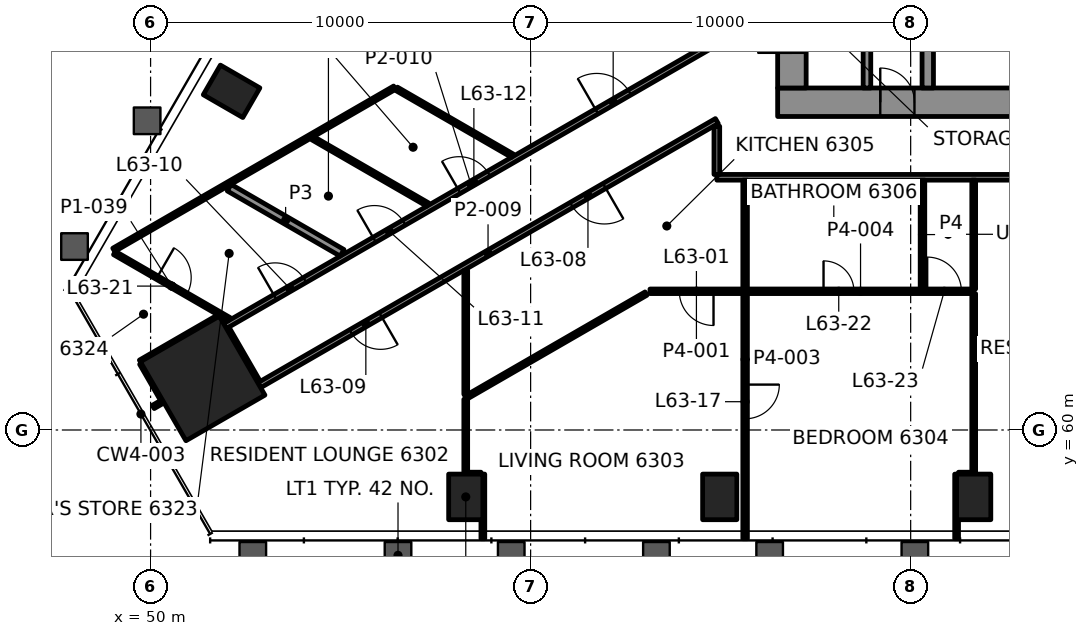
"""IFC4 building model, lengths in metres.
Left out: names, types, materials, properties, quantities, classifications, styles, units other than length and angle.
Written with IfcOpenShell. Run it as: python <this file> out.ifc"""

import sys

from ifc_helpers import new_model, si_unit, direction, frame, frame_2d, origin, origin_2d, place, context, subcontext, project, spatial, rectangle, hollow_rectangle, extrude, element, fill, save


model = new_model("IFC4")
c1 = context("Model", 3, precision=1e-05, world=origin(), true_north=direction((0.0, 1.0)))
c2 = subcontext(c1, "Body", "Model", "MODEL_VIEW")
j1 = project(units=[si_unit("LENGTHUNIT", "METRE"), si_unit("PLANEANGLEUNIT", "RADIAN")], contexts=[c1])
p1 = place(None, origin())
s1 = spatial("IfcSite", under=j1, at=p1, CompositionType="ELEMENT")
p2 = place(p1, origin())
s2 = spatial("IfcBuilding", under=s1, at=p2, CompositionType="ELEMENT")
p3 = place(p2, frame((0.0, 0.0, 267.1)))
s3 = spatial("IfcBuildingStorey", under=s2, at=p3, CompositionType="ELEMENT", Elevation=267.1)
p4 = place(p3, frame((51.37, 61.357, 0.0), z_axis=(0.0, 0.0, 1.0), x_axis=(0.5, -0.866025403784, 0.0)))
e1 = element("IfcColumn", 1, at=p4, inside=s3, PredefinedType="COLUMN", context=c2, shape_type="SweptSolid", body=[
    extrude(rectangle(XDim=2.4, YDim=2.4, at=origin_2d()), origin(), (0.0, 0.0, 1.0), 3.5),
])
for number, where, z_axis, x_axis in (
    (2, (58.293, 58.239, -0.0), (0.0, 0.0, 1.0), (1.0, 0.0, 0.0)),
    (3, (64.976, 58.239, -0.0), (0.0, 0.0, 1.0), (1.0, 0.0, 0.0)),
    (4, (71.659, 58.239, -0.0), (0.0, 0.0, 1.0), (1.0, 0.0, 0.0)),
    (5, (52.131, 68.912, -0.0), (0.0, 0.0, 1.0), (-0.5, -0.866, 0.0)),
):
    element("IfcColumn", number, at=place(p3, frame(where, z_axis=z_axis, x_axis=x_axis)), inside=s3, PredefinedType="COLUMN", context=c2, shape_type="SweptSolid", body=[
        extrude(hollow_rectangle(XDim=0.9, YDim=1.2, WallThickness=0.06, at=origin_2d()), origin(), (0.0, 0.0, 1.0), 3.5),
    ])
p5 = place(p3, frame((66.5, 68.625, 0.0), z_axis=(0.0, 0.0, 1.0), x_axis=(1.0, 0.0, 0.0)))
e6 = element("IfcWall", 6, at=p5, inside=s3, PredefinedType="SHEAR", context=c2, shape_type="SweptSolid", body=[
    extrude(rectangle(XDim=17.0, YDim=0.75, at=frame_2d((8.5, 0.0))), origin(), (0.0, 0.0, 1.0), 3.3),
])
p6 = place(p5, frame((2.7, 0.0, 0.0)))
e7 = element("IfcOpeningElement", 7, at=p6, cuts=e6, PredefinedType="OPENING", context=c2, shape_type="SweptSolid", body=[
    extrude(rectangle(XDim=0.9, YDim=2.1, at=frame_2d((0.45, 1.05))), frame((0.0, 0.385, 0.0), z_axis=(0.0, -1.0, 0.0), x_axis=(1.0, 0.0, 0.0)), (0.0, 0.0, 1.0), 0.77),
])
p7 = place(p3, frame((66.875, 69.0, 0.0), z_axis=(0.0, 0.0, 1.0), x_axis=(0.0, 1.0, 0.0)))
e8 = element("IfcWall", 8, at=p7, inside=s3, PredefinedType="SHEAR", context=c2, shape_type="SweptSolid", body=[
    extrude(rectangle(XDim=12.0, YDim=0.75, at=frame_2d((6.0, 0.0))), origin(), (0.0, 0.0, 1.0), 3.3),
])
p8 = place(p7, frame((3.7, 0.0, 0.0)))
e9 = element("IfcOpeningElement", 9, at=p8, cuts=e8, PredefinedType="OPENING", context=c2, shape_type="SweptSolid", body=[
    extrude(rectangle(XDim=1.2, YDim=2.1, at=frame_2d((0.6, 1.05))), frame((0.0, 0.385, 0.0), z_axis=(0.0, -1.0, 0.0), x_axis=(1.0, 0.0, 0.0)), (0.0, 0.0, 1.0), 0.77),
])
p9 = place(p7, frame((0.925, 0.0, 0.0)))
e10 = element("IfcOpeningElement", 10, at=p9, cuts=e8, PredefinedType="OPENING", context=c2, shape_type="SweptSolid", body=[
    extrude(rectangle(XDim=0.9, YDim=2.1, at=frame_2d((0.45, 1.05))), frame((0.0, 0.385, 0.0), z_axis=(0.0, -1.0, 0.0), x_axis=(1.0, 0.0, 0.0)), (0.0, 0.0, 1.0), 0.77),
])
p10 = place(p3, frame((70.45, 69.0, 0.0), z_axis=(0.0, 0.0, 1.0), x_axis=(0.0, 1.0, 0.0)))
e11 = element("IfcWall", 11, at=p10, inside=s3, PredefinedType="SHEAR", context=c2, shape_type="SweptSolid", body=[
    extrude(rectangle(XDim=2.6, YDim=0.3, at=frame_2d((1.3, 0.0))), origin(), (0.0, 0.0, 1.0), 3.3),
])
p11 = place(p3, frame((58.343, 58.839, 0.0), z_axis=(0.0, 0.0, 1.0), x_axis=(1.0, 0.0, 0.0)))
e12 = element("IfcWall", 12, at=p11, inside=s3, PredefinedType="PARTITIONING", context=c2, shape_type="SweptSolid", body=[
    extrude(rectangle(XDim=0.35, YDim=0.1, at=frame_2d((0.175, 0.0))), origin(), (0.0, 0.0, 1.0), 2.7),
])
p12 = place(p3, frame((71.259, 58.839, 0.0), z_axis=(0.0, 0.0, 1.0), x_axis=(1.0, 0.0, 0.0)))
e13 = element("IfcWall", 13, at=p12, inside=s3, PredefinedType="PARTITIONING", context=c2, shape_type="SweptSolid", body=[
    extrude(rectangle(XDim=0.349, YDim=0.1, at=frame_2d((0.174, 0.0))), origin(), (0.0, 0.0, 1.0), 2.7),
])
p13 = place(p3, frame((65.584, 63.65, 0.0), z_axis=(0.0, 0.0, 1.0), x_axis=(-1.0, 0.0, 0.0)))
e14 = element("IfcWall", 14, at=p13, inside=s3, PredefinedType="PARTITIONING", context=c2, shape_type="SweptSolid", body=[
    extrude(rectangle(XDim=2.443, YDim=0.12, at=frame_2d((1.221, 0.0))), origin(), (0.0, 0.0, 1.0), 2.7),
])
p14 = place(p13, frame((0.771, 0.0, 0.0)))
e15 = element("IfcOpeningElement", 15, at=p14, cuts=e14, PredefinedType="OPENING", context=c2, shape_type="SweptSolid", body=[
    extrude(rectangle(XDim=0.9, YDim=2.1, at=frame_2d((0.45, 1.05))), frame((0.0, 0.07, 0.0), z_axis=(0.0, -1.0, 0.0), x_axis=(1.0, 0.0, 0.0)), (0.0, 0.0, 1.0), 0.14),
])
p15 = place(p3, frame((85.1, 66.65, 0.0), z_axis=(0.0, 0.0, 1.0), x_axis=(-1.0, 0.0, 0.0)))
e16 = element("IfcWall", 16, at=p15, inside=s3, PredefinedType="PARTITIONING", context=c2, shape_type="SweptSolid", body=[
    extrude(rectangle(XDim=20.2, YDim=0.15, at=frame_2d((10.1, 0.0))), origin(), (0.0, 0.0, 1.0), 2.7),
])
p16 = place(p15, frame((1.61, 0.0, 0.0)))
e17 = element("IfcOpeningElement", 17, at=p16, cuts=e16, PredefinedType="OPENING", context=c2, shape_type="SweptSolid", body=[
    extrude(rectangle(XDim=1.0, YDim=2.1, at=frame_2d((0.5, 1.05))), frame((0.0, 0.085, 0.0), z_axis=(0.0, -1.0, 0.0), x_axis=(1.0, 0.0, 0.0)), (0.0, 0.0, 1.0), 0.17),
])
p17 = place(p15, frame((8.229, 0.0, 0.0)))
e18 = element("IfcOpeningElement", 18, at=p17, cuts=e16, PredefinedType="OPENING", context=c2, shape_type="SweptSolid", body=[
    extrude(rectangle(XDim=1.0, YDim=2.1, at=frame_2d((0.5, 1.05))), frame((0.0, 0.085, 0.0), z_axis=(0.0, -1.0, 0.0), x_axis=(1.0, 0.0, 0.0)), (0.0, 0.0, 1.0), 0.17),
])
p18 = place(p3, frame((58.293, 60.851, 0.0), z_axis=(0.0, 0.0, 1.0), x_axis=(0.866026762963, 0.499997645826, 0.0)))
e19 = element("IfcWall", 19, at=p18, inside=s3, PredefinedType="PARTITIONING", context=c2, shape_type="SweptSolid", body=[
    extrude(rectangle(XDim=5.478, YDim=0.1, at=frame_2d((2.739, 0.0))), origin(), (0.0, 0.0, 1.0), 2.7),
])
p19 = place(p3, frame((64.9, 68.13, 0.0), z_axis=(0.0, 0.0, 1.0), x_axis=(-0.866020369651, -0.500008719273, 0.0)))
e20 = element("IfcWall", 20, at=p19, inside=s3, PredefinedType="PARTITIONING", context=c2, shape_type="SweptSolid", body=[
    extrude(rectangle(XDim=13.904, YDim=0.15, at=frame_2d((6.952, 0.0))), origin(), (0.0, 0.0, 1.0), 2.547),
])
p20 = place(p19, frame((3.416, 0.0, 0.0)))
e21 = element("IfcOpeningElement", 21, at=p20, cuts=e20, PredefinedType="OPENING", context=c2, shape_type="SweptSolid", body=[
    extrude(rectangle(XDim=1.0, YDim=2.1, at=frame_2d((0.5, 1.05))), frame((0.0, 0.085, 0.0), z_axis=(0.0, -1.0, 0.0), x_axis=(1.0, 0.0, 0.0)), (0.0, 0.0, 1.0), 0.17),
])
p21 = place(p19, frame((10.215, 0.0, 0.0)))
e22 = element("IfcOpeningElement", 22, at=p21, cuts=e20, PredefinedType="OPENING", context=c2, shape_type="SweptSolid", body=[
    extrude(rectangle(XDim=0.9, YDim=2.1, at=frame_2d((0.45, 1.05))), frame((0.0, 0.085, 0.0), z_axis=(0.0, -1.0, 0.0), x_axis=(1.0, 0.0, 0.0)), (0.0, 0.0, 1.0), 0.17),
])
p22 = place(p3, frame((50.07, 60.607, 0.0), z_axis=(0.0, 0.0, 1.0), x_axis=(0.866071776036, 0.499919672301, 0.0)))
e23 = element("IfcWall", 23, at=p22, inside=s3, PredefinedType="PARTITIONING", context=c2, shape_type="SweptSolid", body=[
    extrude(rectangle(XDim=0.25, YDim=0.1, at=frame_2d((0.125, 0.0))), origin(), (0.0, 0.0, 1.0), 2.7),
])
p23 = place(p3, frame((51.959, 62.736, 0.0), z_axis=(0.0, 0.0, 1.0), x_axis=(0.866022614424, 0.500004831283, 0.0)))
e24 = element("IfcWall", 24, at=p23, inside=s3, PredefinedType="PARTITIONING", context=c2, shape_type="SweptSolid", body=[
    extrude(rectangle(XDim=14.943, YDim=0.15, at=frame_2d((7.472, 0.0))), origin(), (0.0, 0.0, 1.0), 2.7),
])
p24 = place(p23, frame((1.522, 0.0, 0.0)))
e25 = element("IfcOpeningElement", 25, at=p24, cuts=e24, PredefinedType="OPENING", context=c2, shape_type="SweptSolid", body=[
    extrude(rectangle(XDim=0.9, YDim=2.1, at=frame_2d((0.45, 1.05))), frame((0.0, 0.085, 0.0), z_axis=(0.0, -1.0, 0.0), x_axis=(1.0, 0.0, 0.0)), (0.0, 0.0, 1.0), 0.17),
])
p25 = place(p23, frame((4.539, 0.0, 0.0)))
e26 = element("IfcOpeningElement", 26, at=p25, cuts=e24, PredefinedType="OPENING", context=c2, shape_type="SweptSolid", body=[
    extrude(rectangle(XDim=0.9, YDim=2.1, at=frame_2d((0.45, 1.05))), frame((0.0, 0.085, 0.0), z_axis=(0.0, -1.0, 0.0), x_axis=(1.0, 0.0, 0.0)), (0.0, 0.0, 1.0), 0.17),
])
p26 = place(p23, frame((7.111, 0.0, 0.0)))
e27 = element("IfcOpeningElement", 27, at=p26, cuts=e24, PredefinedType="OPENING", context=c2, shape_type="SweptSolid", body=[
    extrude(rectangle(XDim=0.9, YDim=2.1, at=frame_2d((0.45, 1.05))), frame((0.0, 0.085, 0.0), z_axis=(0.0, -1.0, 0.0), x_axis=(1.0, 0.0, 0.0)), (0.0, 0.0, 1.0), 0.17),
])
p27 = place(p23, frame((11.294, 0.0, 0.0)))
e28 = element("IfcOpeningElement", 28, at=p27, cuts=e24, PredefinedType="OPENING", context=c2, shape_type="SweptSolid", body=[
    extrude(rectangle(XDim=1.0, YDim=2.1, at=frame_2d((0.5, 1.05))), frame((0.0, 0.085, 0.0), z_axis=(0.0, -1.0, 0.0), x_axis=(1.0, 0.0, 0.0)), (0.0, 0.0, 1.0), 0.17),
])
p28 = place(p3, frame((49.73, 61.796, 0.0), z_axis=(0.0, 0.0, 1.0), x_axis=(0.86603458294, 0.499984100898, 0.0)))
e29 = element("IfcWall", 29, at=p28, inside=s3, PredefinedType="PARTITIONING", context=c2, shape_type="SweptSolid", body=[
    extrude(rectangle(XDim=2.342, YDim=0.1, at=frame_2d((1.171, 0.0))), origin(), (0.0, 0.0, 1.0), 2.7),
])
p29 = place(p3, frame((49.03, 64.741, 0.0), z_axis=(0.0, 0.0, 1.0), x_axis=(0.866019796467, 0.500009712033, 0.0)))
e30 = element("IfcWall", 30, at=p29, inside=s3, PredefinedType="PARTITIONING", context=c2, shape_type="SweptSolid", body=[
    extrude(rectangle(XDim=8.534, YDim=0.1, at=frame_2d((4.267, 0.0))), origin(), (0.0, 0.0, 1.0), 2.7),
])
p30 = place(p3, frame((71.659, 58.84, 0.0), z_axis=(0.0, 0.0, 1.0), x_axis=(0.0, 1.0, 0.0)))
e31 = element("IfcWall", 31, at=p30, inside=s3, PredefinedType="PARTITIONING", context=c2, shape_type="SweptSolid", body=[
    extrude(rectangle(XDim=4.75, YDim=0.1, at=frame_2d((2.375, 0.0))), origin(), (0.0, 0.0, 1.0), 2.7),
])
p31 = place(p3, frame((71.209, 57.139, 0.0), z_axis=(0.0, 0.0, 1.0), x_axis=(0.0, 1.0, 0.0)))
e32 = element("IfcWall", 32, at=p31, inside=s3, PredefinedType="PARTITIONING", context=c2, shape_type="SweptSolid", body=[
    extrude(rectangle(XDim=1.699, YDim=0.1, at=frame_2d((0.85, 0.0))), origin(), (0.0, 0.0, 1.0), 2.688),
])
p32 = place(p3, frame((70.311, 63.71, 0.0), z_axis=(0.0, 0.0, 1.0), x_axis=(0.0, 1.0, 0.0)))
e33 = element("IfcWall", 33, at=p32, inside=s3, PredefinedType="PARTITIONING", context=c2, shape_type="SweptSolid", body=[
    extrude(rectangle(XDim=2.865, YDim=0.12, at=frame_2d((1.433, 0.0))), origin(), (0.0, 0.0, 1.0), 2.7),
])
p33 = place(p3, frame((65.644, 66.575, 0.0), z_axis=(0.0, 0.0, 1.0), x_axis=(0.0, -1.0, 0.0)))
e34 = element("IfcWall", 34, at=p33, inside=s3, PredefinedType="PARTITIONING", context=c2, shape_type="SweptSolid", body=[
    extrude(rectangle(XDim=9.436, YDim=0.12, at=frame_2d((4.718, 0.0))), origin(), (0.0, 0.0, 1.0), 2.688),
])
p34 = place(p33, frame((5.38, 0.0, 0.0)))
e35 = element("IfcOpeningElement", 35, at=p34, cuts=e34, PredefinedType="OPENING", context=c2, shape_type="SweptSolid", body=[
    extrude(rectangle(XDim=0.9, YDim=2.1, at=frame_2d((0.45, 1.05))), frame((0.0, 0.07, 0.0), z_axis=(0.0, -1.0, 0.0), x_axis=(1.0, 0.0, 0.0)), (0.0, 0.0, 1.0), 0.14),
])
p35 = place(p3, frame((64.9, 66.725, 0.0), z_axis=(0.0, 0.0, 1.0), x_axis=(0.0, 1.0, 0.0)))
e36 = element("IfcWall", 36, at=p35, inside=s3, PredefinedType="PARTITIONING", context=c2, shape_type="SweptSolid", body=[
    extrude(rectangle(XDim=1.268, YDim=0.15, at=frame_2d((0.634, 0.0))), origin(), (0.0, 0.0, 1.0), 2.547),
])
p36 = place(p3, frame((58.743, 57.139, 0.0), z_axis=(0.0, 0.0, 1.0), x_axis=(0.0, 1.0, 0.0)))
e37 = element("IfcWall", 37, at=p36, inside=s3, PredefinedType="PARTITIONING", context=c2, shape_type="SweptSolid", body=[
    extrude(rectangle(XDim=1.699, YDim=0.1, at=frame_2d((0.85, 0.0))), origin(), (0.0, 0.0, 1.0), 2.688),
])
p37 = place(p3, frame((58.293, 58.839, 0.0), z_axis=(0.0, 0.0, 1.0), x_axis=(0.0, 1.0, 0.0)))
e38 = element("IfcWall", 38, at=p37, inside=s3, PredefinedType="PARTITIONING", context=c2, shape_type="SweptSolid", body=[
    extrude(rectangle(XDim=1.969, YDim=0.1, at=frame_2d((0.984, 0.0))), origin(), (0.0, 0.0, 1.0), 2.7),
])
p38 = place(p3, frame((52.821, 61.243, 0.0), z_axis=(0.0, 0.0, 1.0), x_axis=(-0.499970888758, 0.866042210515, 0.0)))
e39 = element("IfcWall", 39, at=p38, inside=s3, PredefinedType="PARTITIONING", context=c2, shape_type="SweptSolid", body=[
    extrude(rectangle(XDim=1.645, YDim=0.15, at=frame_2d((0.822, 0.0))), origin(), (0.0, 0.0, 1.0), 2.547),
])
p39 = place(p3, frame((50.331, 60.757, 0.0), z_axis=(0.0, 0.0, 1.0), x_axis=(-0.500157339417, 0.865934544771, 0.0)))
e40 = element("IfcWall", 40, at=p39, inside=s3, PredefinedType="PARTITIONING", context=c2, shape_type="SweptSolid", body=[
    extrude(rectangle(XDim=1.15, YDim=0.1, at=frame_2d((0.575, 0.0))), origin(), (0.0, 0.0, 1.0), 2.7),
])
p40 = place(p3, frame((59.52, 67.219, 0.0), z_axis=(0.0, 0.0, 1.0), x_axis=(-0.866011216541, 0.500024572222, 0.0)))
e41 = element("IfcWall", 41, at=p40, inside=s3, PredefinedType="PARTITIONING", context=c2, shape_type="SweptSolid", body=[
    extrude(rectangle(XDim=3.521, YDim=0.1, at=frame_2d((1.76, 0.0))), origin(), (0.0, 0.0, 1.0), 2.7),
])
p41 = place(p3, frame((57.292, 65.932, 0.0), z_axis=(0.0, 0.0, 1.0), x_axis=(-0.866017863565, 0.500013059815, 0.0)))
e42 = element("IfcWall", 42, at=p41, inside=s3, PredefinedType="PARTITIONING", context=c2, shape_type="SweptSolid", body=[
    extrude(rectangle(XDim=3.491, YDim=0.1, at=frame_2d((1.745, 0.0))), origin(), (0.0, 0.0, 1.0), 2.7),
])
p42 = place(p3, frame((55.039, 64.662, 0.0), z_axis=(0.0, 0.0, 1.0), x_axis=(-0.866036273972, 0.49998117181, 0.0)))
e43 = element("IfcWall", 43, at=p42, inside=s3, PredefinedType="PARTITIONING", context=c2, shape_type="SweptSolid", body=[
    extrude(rectangle(XDim=3.431, YDim=0.2, at=frame_2d((1.715, 0.0))), origin(), (0.0, 0.0, 1.0), 2.7),
])
p43 = place(p3, frame((49.049, 64.658, 0.0), z_axis=(0.0, 0.0, 1.0), x_axis=(0.866031592922, -0.499989279946, 0.0)))
e44 = element("IfcWall", 44, at=p43, inside=s3, PredefinedType="PARTITIONING", context=c2, shape_type="SweptSolid", body=[
    extrude(rectangle(XDim=3.485, YDim=0.1, at=frame_2d((1.742, 0.0))), origin(), (0.0, 0.0, 1.0), 2.7),
])
p44 = place(p43, frame((1.292, 0.0, 0.0)))
e45 = element("IfcOpeningElement", 45, at=p44, cuts=e44, PredefinedType="OPENING", context=c2, shape_type="SweptSolid", body=[
    extrude(rectangle(XDim=0.9, YDim=2.1, at=frame_2d((0.45, 1.05))), frame((0.0, 0.06, 0.0), z_axis=(0.0, -1.0, 0.0), x_axis=(1.0, 0.0, 0.0)), (0.0, 0.0, 1.0), 0.12),
])
p45 = place(p3, frame((71.659, 63.71, 0.0), z_axis=(0.0, 0.0, 1.0), x_axis=(0.0, 1.0, 0.0)))
e46 = element("IfcWall", 46, at=p45, inside=s3, PredefinedType="PARTITIONING", context=c2, shape_type="SweptSolid", body=[
    extrude(rectangle(XDim=2.865, YDim=0.1, at=frame_2d((1.433, 0.0))), origin(), (0.0, 0.0, 1.0), 2.7),
])
p46 = place(p3, frame((58.293, 60.938, 0.0), z_axis=(0.0, 0.0, 1.0), x_axis=(0.0, 1.0, 0.0)))
e47 = element("IfcWall", 47, at=p46, inside=s3, PredefinedType="PARTITIONING", context=c2, shape_type="SweptSolid", body=[
    extrude(rectangle(XDim=3.261, YDim=0.1, at=frame_2d((1.63, 0.0))), origin(), (0.0, 0.0, 1.0), 2.7),
])
p47 = place(p3, frame((65.704, 63.65, 0.0), z_axis=(0.0, 0.0, 1.0), x_axis=(1.0, 0.0, 0.0)))
e48 = element("IfcWall", 48, at=p47, inside=s3, PredefinedType="PARTITIONING", context=c2, shape_type="SweptSolid", body=[
    extrude(rectangle(XDim=5.955, YDim=0.12, at=frame_2d((2.977, 0.0))), origin(), (0.0, 0.0, 1.0), 2.7),
])
p48 = place(p47, frame((2.003, 0.0, 0.0)))
e49 = element("IfcOpeningElement", 49, at=p48, cuts=e48, PredefinedType="OPENING", context=c2, shape_type="SweptSolid", body=[
    extrude(rectangle(XDim=0.8, YDim=2.1, at=frame_2d((0.4, 1.05))), frame((0.0, 0.07, 0.0), z_axis=(0.0, -1.0, 0.0), x_axis=(1.0, 0.0, 0.0)), (0.0, 0.0, 1.0), 0.14),
])
p49 = place(p47, frame((4.731, 0.0, 0.0)))
e50 = element("IfcOpeningElement", 50, at=p49, cuts=e48, PredefinedType="OPENING", context=c2, shape_type="SweptSolid", body=[
    extrude(rectangle(XDim=0.9, YDim=2.1, at=frame_2d((0.45, 1.05))), frame((0.0, 0.07, 0.0), z_axis=(0.0, -1.0, 0.0), x_axis=(1.0, 0.0, 0.0)), (0.0, 0.0, 1.0), 0.14),
])
p50 = place(p3, frame((68.85, 69.0, 0.0), z_axis=(0.0, 0.0, 1.0), x_axis=(0.0, 1.0, 0.0)))
e51 = element("IfcWall", 51, at=p50, inside=s3, PredefinedType="PARTITIONING", context=c2, shape_type="SweptSolid", body=[
    extrude(rectangle(XDim=2.65, YDim=0.2, at=frame_2d((1.325, 0.0))), origin(), (0.0, 0.0, 1.0), 3.3),
])
p51 = place(p14, origin())
e52 = element("IfcDoor", 52, at=p51, inside=s3, OperationType="SINGLE_SWING_LEFT", PredefinedType="DOOR", context=c2, shape_type="SweptSolid", body=[
    extrude(rectangle(XDim=0.9, YDim=2.1, at=frame_2d((0.45, 1.05))), frame((0.0, 0.025, 0.0), z_axis=(0.0, -1.0, 0.0), x_axis=(1.0, 0.0, 0.0)), (0.0, 0.0, 1.0), 0.05),
])
fill(e15, e52)
p52 = place(p20, origin())
e53 = element("IfcDoor", 53, at=p52, inside=s3, OperationType="SINGLE_SWING_RIGHT", PredefinedType="DOOR", context=c2, shape_type="SweptSolid", body=[
    extrude(rectangle(XDim=1.0, YDim=2.1, at=frame_2d((0.5, 1.05))), frame((0.0, 0.025, 0.0), z_axis=(0.0, -1.0, 0.0), x_axis=(1.0, 0.0, 0.0)), (0.0, 0.0, 1.0), 0.05),
])
fill(e21, e53)
p53 = place(p21, origin())
e54 = element("IfcDoor", 54, at=p53, inside=s3, OperationType="SINGLE_SWING_RIGHT", PredefinedType="DOOR", context=c2, shape_type="SweptSolid", body=[
    extrude(rectangle(XDim=0.9, YDim=2.1, at=frame_2d((0.45, 1.05))), frame((0.0, 0.025, 0.0), z_axis=(0.0, -1.0, 0.0), x_axis=(1.0, 0.0, 0.0)), (0.0, 0.0, 1.0), 0.05),
])
fill(e22, e54)
p54 = place(p24, origin())
e55 = element("IfcDoor", 55, at=p54, inside=s3, OperationType="SINGLE_SWING_RIGHT", PredefinedType="DOOR", context=c2, shape_type="SweptSolid", body=[
    extrude(rectangle(XDim=0.9, YDim=2.1, at=frame_2d((0.45, 1.05))), frame((0.0, 0.025, 0.0), z_axis=(0.0, -1.0, 0.0), x_axis=(1.0, 0.0, 0.0)), (0.0, 0.0, 1.0), 0.05),
])
fill(e25, e55)
p55 = place(p25, origin())
e56 = element("IfcDoor", 56, at=p55, inside=s3, OperationType="SINGLE_SWING_LEFT", PredefinedType="DOOR", context=c2, shape_type="SweptSolid", body=[
    extrude(rectangle(XDim=0.9, YDim=2.1, at=frame_2d((0.45, 1.05))), frame((0.0, 0.025, 0.0), z_axis=(0.0, -1.0, 0.0), x_axis=(1.0, 0.0, 0.0)), (0.0, 0.0, 1.0), 0.05),
])
fill(e26, e56)
p56 = place(p26, origin())
e57 = element("IfcDoor", 57, at=p56, inside=s3, OperationType="SINGLE_SWING_RIGHT", PredefinedType="DOOR", context=c2, shape_type="SweptSolid", body=[
    extrude(rectangle(XDim=0.9, YDim=2.1, at=frame_2d((0.45, 1.05))), frame((0.0, 0.025, 0.0), z_axis=(0.0, -1.0, 0.0), x_axis=(1.0, 0.0, 0.0)), (0.0, 0.0, 1.0), 0.05),
])
fill(e27, e57)
p57 = place(p27, origin())
e58 = element("IfcDoor", 58, at=p57, inside=s3, OperationType="SINGLE_SWING_LEFT", PredefinedType="DOOR", context=c2, shape_type="SweptSolid", body=[
    extrude(rectangle(XDim=1.0, YDim=2.1, at=frame_2d((0.5, 1.05))), frame((0.0, 0.025, 0.0), z_axis=(0.0, -1.0, 0.0), x_axis=(1.0, 0.0, 0.0)), (0.0, 0.0, 1.0), 0.05),
])
fill(e28, e58)
p58 = place(p34, origin())
e59 = element("IfcDoor", 59, at=p58, inside=s3, OperationType="SINGLE_SWING_LEFT", PredefinedType="DOOR", context=c2, shape_type="SweptSolid", body=[
    extrude(rectangle(XDim=0.9, YDim=2.1, at=frame_2d((0.45, 1.05))), frame((0.0, 0.025, 0.0), z_axis=(0.0, -1.0, 0.0), x_axis=(1.0, 0.0, 0.0)), (0.0, 0.0, 1.0), 0.05),
])
fill(e35, e59)
p59 = place(p44, origin())
e60 = element("IfcDoor", 60, at=p59, inside=s3, OperationType="SINGLE_SWING_RIGHT", PredefinedType="DOOR", context=c2, shape_type="SweptSolid", body=[
    extrude(rectangle(XDim=0.9, YDim=2.1, at=frame_2d((0.45, 1.05))), frame((0.0, 0.025, 0.0), z_axis=(0.0, -1.0, 0.0), x_axis=(1.0, 0.0, 0.0)), (0.0, 0.0, 1.0), 0.05),
])
fill(e45, e60)
p60 = place(p48, origin())
e61 = element("IfcDoor", 61, at=p60, inside=s3, OperationType="SINGLE_SWING_RIGHT", PredefinedType="DOOR", context=c2, shape_type="SweptSolid", body=[
    extrude(rectangle(XDim=0.8, YDim=2.1, at=frame_2d((0.4, 1.05))), frame((0.0, 0.025, 0.0), z_axis=(0.0, -1.0, 0.0), x_axis=(1.0, 0.0, 0.0)), (0.0, 0.0, 1.0), 0.05),
])
fill(e49, e61)
p61 = place(p49, origin())
e62 = element("IfcDoor", 62, at=p61, inside=s3, OperationType="SINGLE_SWING_LEFT", PredefinedType="DOOR", context=c2, shape_type="SweptSolid", body=[
    extrude(rectangle(XDim=0.9, YDim=2.1, at=frame_2d((0.45, 1.05))), frame((0.0, 0.025, 0.0), z_axis=(0.0, -1.0, 0.0), x_axis=(1.0, 0.0, 0.0)), (0.0, 0.0, 1.0), 0.05),
])
fill(e50, e62)
p62 = place(p9, origin())
e63 = element("IfcDoor", 63, at=p62, inside=s3, OperationType="SINGLE_SWING_RIGHT", PredefinedType="DOOR", context=c2, shape_type="SweptSolid", body=[
    extrude(rectangle(XDim=0.9, YDim=2.1, at=frame_2d((0.45, 1.05))), frame((0.0, 0.095, 0.0), z_axis=(0.0, -1.0, 0.0), x_axis=(1.0, 0.0, 0.0)), (0.0, 0.0, 1.0), 0.19),
])
fill(e10, e63)
p63 = place(p6, origin())
e64 = element("IfcDoor", 64, at=p63, inside=s3, OperationType="SINGLE_SWING_LEFT", PredefinedType="DOOR", context=c2, shape_type="SweptSolid", body=[
    extrude(rectangle(XDim=0.9, YDim=2.1, at=frame_2d((0.45, 1.05))), frame((0.0, 0.095, 0.0), z_axis=(0.0, -1.0, 0.0), x_axis=(1.0, 0.0, 0.0)), (0.0, 0.0, 1.0), 0.19),
])
fill(e7, e64)
save(model, sys.argv[1])
